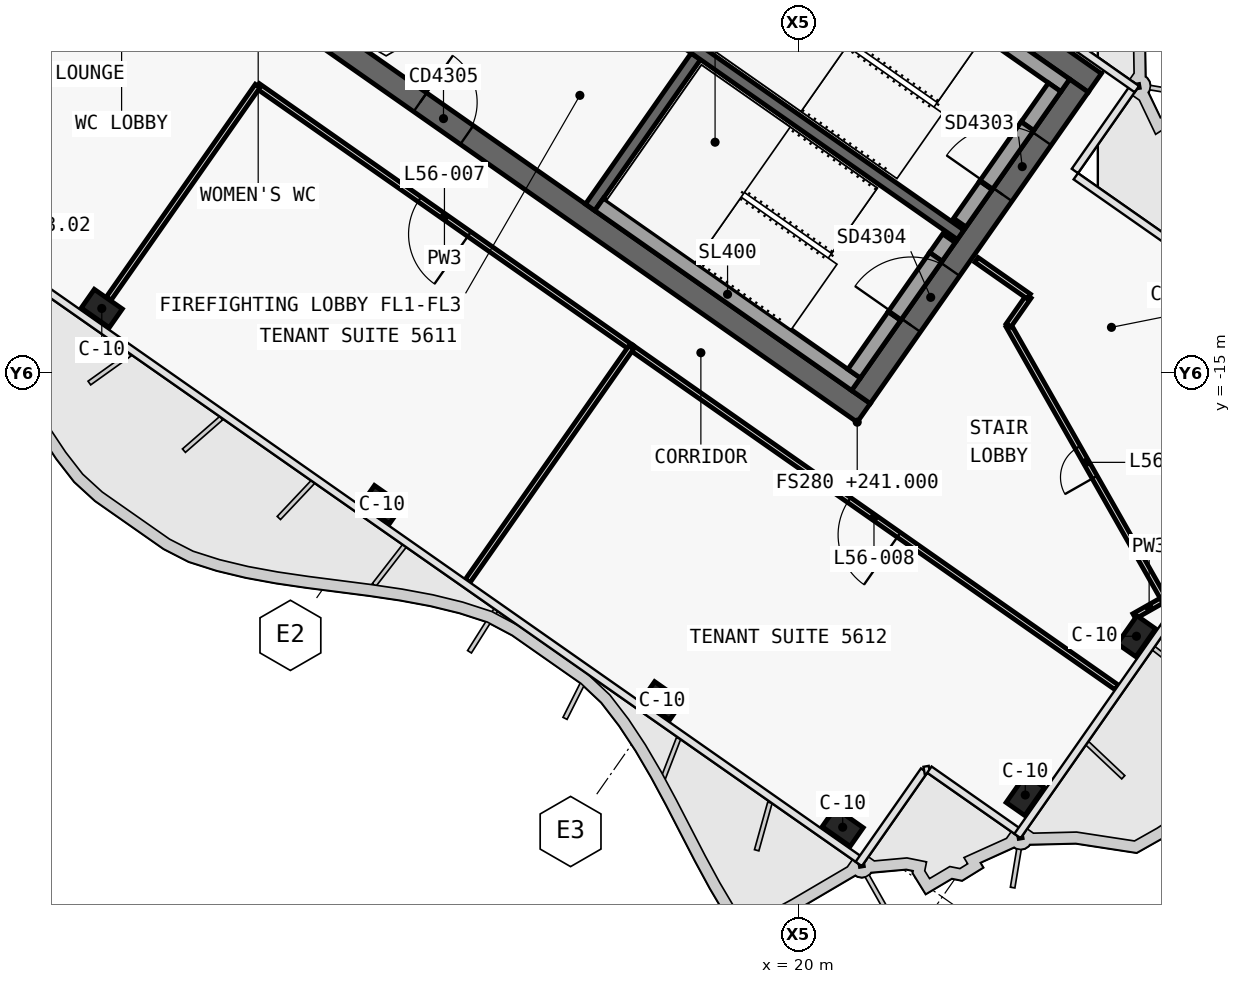
"""IFC4 building model, lengths in metres.
Left out: names, types, materials, properties, quantities, classifications, styles, units other than length and angle.
Written with IfcOpenShell. Run it as: python <this file> out.ifc"""

import sys

from ifc_helpers import new_model, si_unit, direction, frame, frame_2d, origin, origin_2d, place, context, subcontext, project, spatial, polyline, rectangle, outline, extrude, element, fill, save


model = new_model("IFC4")
c1 = context("Model", 3, precision=1e-05, world=origin(), true_north=direction((0.0, 1.0)))
c2 = subcontext(c1, "Body", "Model", "MODEL_VIEW")
j1 = project(units=[si_unit("LENGTHUNIT", "METRE"), si_unit("PLANEANGLEUNIT", "RADIAN")], contexts=[c1])
p1 = place(None, origin())
s1 = spatial("IfcSite", under=j1, at=p1, CompositionType="ELEMENT")
p2 = place(p1, origin())
s2 = spatial("IfcBuilding", under=s1, at=p2, CompositionType="ELEMENT")
p3 = place(p2, frame((0.0, 0.0, 241.0)))
s3 = spatial("IfcBuildingStorey", under=s2, at=p3, CompositionType="ELEMENT", Elevation=241.0)
p4 = place(p3, frame((0.028, 12.066, 0.0), z_axis=(0.0, 0.0, 1.0), x_axis=(0.819151382952, -0.573577380837, 0.0)))
e1 = element("IfcWall", 1, at=p4, inside=s3, PredefinedType="SHEAR", context=c2, shape_type="SweptSolid", body=[
    extrude(outline(polyline([(33.898, 0.3), (0.0, 0.3), (0.42, -0.3), (33.898, -0.3), (33.898, 0.3)])), origin(), (0.0, 0.0, 1.0), 3.9),
])
p5 = place(p3, frame((0.028, -0.874, 0.0), z_axis=(0.0, 0.0, 1.0), x_axis=(0.819150035022, -0.573579305871, 0.0)))
e2 = element("IfcWall", 2, at=p5, inside=s3, PredefinedType="SHEAR", context=c2, shape_type="SweptSolid", body=[
    extrude(outline(polyline([(26.476, 0.3), (0.0, 0.3), (0.42, -0.3), (26.476, -0.3), (26.476, 0.3)])), origin(), (0.0, 0.0, 1.0), 3.9),
])
p6 = place(p5, frame((0.826, 0.0, 0.0)))
e3 = element("IfcOpeningElement", 3, at=p6, cuts=e2, PredefinedType="OPENING", context=c2, shape_type="SweptSolid", body=[
    extrude(rectangle(XDim=1.5, YDim=2.1, at=frame_2d((0.75, 1.05))), frame((0.0, 0.31, 0.0), z_axis=(0.0, -1.0, 0.0), x_axis=(1.0, 0.0, 0.0)), (0.0, 0.0, 1.0), 0.62),
])
p7 = place(p5, frame((12.226, 0.0, 0.0)))
e4 = element("IfcOpeningElement", 4, at=p7, cuts=e2, PredefinedType="OPENING", context=c2, shape_type="SweptSolid", body=[
    extrude(rectangle(XDim=1.5, YDim=2.1, at=frame_2d((0.75, 1.05))), frame((0.0, 0.31, 0.0), z_axis=(0.0, -1.0, 0.0), x_axis=(1.0, 0.0, 0.0)), (0.0, 0.0, 1.0), 0.62),
])
p8 = place(p3, frame((21.642, -15.642, 0.0), z_axis=(0.0, 0.0, 1.0), x_axis=(0.573586866468, 0.819144740944, 0.0)))
e5 = element("IfcWall", 5, at=p8, inside=s3, PredefinedType="SHEAR", context=c2, shape_type="SweptSolid", body=[
    extrude(outline(polyline([(10.0, 0.3), (0.0, 0.3), (0.0, -0.3), (10.0, -0.3), (10.0, 0.3)])), origin(), (0.0, 0.0, 1.0), 3.9),
])
p9 = place(p8, frame((6.5, 0.0, 0.0)))
e6 = element("IfcOpeningElement", 6, at=p9, cuts=e5, PredefinedType="OPENING", context=c2, shape_type="SweptSolid", body=[
    extrude(rectangle(XDim=1.8, YDim=2.1, at=frame_2d((0.9, 1.05))), frame((0.0, 0.31, 0.0), z_axis=(0.0, -1.0, 0.0), x_axis=(1.0, 0.0, 0.0)), (0.0, 0.0, 1.0), 0.62),
])
p10 = place(p8, frame((2.3, 0.0, 0.0)))
e7 = element("IfcOpeningElement", 7, at=p10, cuts=e5, PredefinedType="OPENING", context=c2, shape_type="SweptSolid", body=[
    extrude(rectangle(XDim=1.8, YDim=2.1, at=frame_2d((0.9, 1.05))), frame((0.0, 0.31, 0.0), z_axis=(0.0, -1.0, 0.0), x_axis=(1.0, 0.0, 0.0)), (0.0, 0.0, 1.0), 0.62),
])
p11 = place(p3, frame((14.515, -10.652, 0.0), z_axis=(0.0, 0.0, 1.0), x_axis=(0.573560315113, 0.819163332265, 0.0)))
e8 = element("IfcWall", 8, at=p11, inside=s3, PredefinedType="SHEAR", context=c2, shape_type="SweptSolid", body=[
    extrude(outline(polyline([(0.0, 0.15), (0.0, -0.15), (4.85, -0.15), (4.85, 0.15), (0.0, 0.15)])), origin(), (0.0, 0.0, 1.0), 3.9),
])
p12 = place(p3, frame((2.638, 3.768, 0.0), z_axis=(0.0, 0.0, 1.0), x_axis=(0.819155014212, -0.573572194837, 0.0)))
e9 = element("IfcWall", 9, at=p12, inside=s3, PredefinedType="SHEAR", context=c2, shape_type="SweptSolid", body=[
    extrude(outline(polyline([(0.0, 0.15), (0.0, -0.15), (26.4, -0.15), (26.4, 0.15), (0.0, 0.15)])), origin(), (0.0, 0.0, 1.0), 3.9),
])
p13 = place(p12, frame((9.637, 0.0, 0.0)))
e10 = element("IfcOpeningElement", 10, at=p13, cuts=e9, PredefinedType="OPENING", context=c2, shape_type="SweptSolid", body=[
    extrude(rectangle(XDim=1.2, YDim=2.1, at=frame_2d((0.6, 1.05))), frame((0.0, 0.16, 0.0), z_axis=(0.0, -1.0, 0.0), x_axis=(1.0, 0.0, 0.0)), (0.0, 0.0, 1.0), 0.32),
])
p14 = place(p12, frame((11.812, 0.0, 0.0)))
e11 = element("IfcOpeningElement", 11, at=p14, cuts=e9, PredefinedType="OPENING", context=c2, shape_type="SweptSolid", body=[
    extrude(rectangle(XDim=1.2, YDim=2.1, at=frame_2d((0.6, 1.05))), frame((0.0, 0.16, 0.0), z_axis=(0.0, -1.0, 0.0), x_axis=(1.0, 0.0, 0.0)), (0.0, 0.0, 1.0), 0.32),
])
p15 = place(p12, frame((13.988, 0.0, 0.0)))
e12 = element("IfcOpeningElement", 12, at=p15, cuts=e9, PredefinedType="OPENING", context=c2, shape_type="SweptSolid", body=[
    extrude(rectangle(XDim=1.2, YDim=2.1, at=frame_2d((0.6, 1.05))), frame((0.0, 0.16, 0.0), z_axis=(0.0, -1.0, 0.0), x_axis=(1.0, 0.0, 0.0)), (0.0, 0.0, 1.0), 0.32),
])
p16 = place(p12, frame((16.262, 0.0, 0.0)))
e13 = element("IfcOpeningElement", 13, at=p16, cuts=e9, PredefinedType="OPENING", context=c2, shape_type="SweptSolid", body=[
    extrude(rectangle(XDim=1.0, YDim=2.1, at=frame_2d((0.5, 1.05))), frame((0.0, 0.16, 0.0), z_axis=(0.0, -1.0, 0.0), x_axis=(1.0, 0.0, 0.0)), (0.0, 0.0, 1.0), 0.32),
])
for number, where, z_axis, x_axis in (
    (14, (1.665, -13.313, 0.0), (0.0, 0.0, 1.0), (0.819, -0.574, 0.0)),
    (15, (9.038, -18.475, 0.0), (0.0, 0.0, 1.0), (0.819, -0.574, 0.0)),
    (16, (16.41, -23.637, 0.0), (0.0, 0.0, 1.0), (0.819, -0.574, 0.0)),
    (17, (21.161, -26.964, 0.0), (0.0, 0.0, 1.0), (0.819, -0.574, 0.0)),
    (18, (25.966, -26.117, 0.0), (0.0, 0.0, 1.0), (0.574, 0.819, 0.0)),
    (19, (28.891, -21.939, 0.0), (0.0, 0.0, 1.0), (0.574, 0.819, 0.0)),
):
    element("IfcColumn", number, at=place(p3, frame(where, z_axis=z_axis, x_axis=x_axis)), inside=s3, PredefinedType="COLUMN", context=c2, shape_type="SweptSolid", body=[
        extrude(rectangle(XDim=0.9, YDim=0.6, at=origin_2d()), origin(), (0.0, 0.0, 1.0), 3.9),
    ])
p17 = place(p3, frame((20.259, -2.71, 0.0), z_axis=(0.0, 0.0, 1.0), x_axis=(0.81914849389, -0.573581506813, 0.0)))
e20 = element("IfcWall", 20, at=p17, inside=s3, PredefinedType="SOLIDWALL", context=c2, shape_type="SweptSolid", body=[
    extrude(rectangle(XDim=8.25, YDim=0.4, at=frame_2d((4.125, 0.0))), origin(), (0.0, 0.0, 1.0), 3.62),
])
p18 = place(p3, frame((24.244, -11.055, 0.0), z_axis=(0.0, 0.0, 1.0), x_axis=(0.573571582932, 0.819155442668, 0.0)))
e21 = element("IfcWall", 21, at=p18, inside=s3, PredefinedType="SOLIDWALL", context=c2, shape_type="SweptSolid", body=[
    extrude(rectangle(XDim=1.2, YDim=0.4, at=frame_2d((0.6, 0.0))), origin(), (0.0, 0.0, 1.0), 3.62),
])
p19 = place(p3, frame((26.022, -8.515, 0.0), z_axis=(0.0, 0.0, 1.0), x_axis=(0.573619628835, 0.819121798889, 0.0)))
e22 = element("IfcWall", 22, at=p19, inside=s3, PredefinedType="SOLIDWALL", context=c2, shape_type="SweptSolid", body=[
    extrude(rectangle(XDim=1.25, YDim=0.4, at=frame_2d((0.625, 0.0))), origin(), (0.0, 0.0, 1.0), 3.62),
])
p20 = place(p3, frame((24.932, -10.072, 2.15), z_axis=(0.0, 0.0, 1.0), x_axis=(0.573591692345, 0.819141361715, 0.0)))
e23 = element("IfcWall", 23, at=p20, inside=s3, PredefinedType="SOLIDWALL", context=c2, shape_type="SweptSolid", body=[
    extrude(rectangle(XDim=1.9, YDim=0.4, at=frame_2d((0.95, 0.0))), origin(), (0.0, 0.0, 1.0), 1.47),
])
p21 = place(p3, frame((14.753, -10.574, 0.0), z_axis=(0.0, 0.0, 1.0), x_axis=(0.819158229677, -0.573567602601, 0.0)))
e24 = element("IfcWall", 24, at=p21, inside=s3, PredefinedType="SOLIDWALL", context=c2, shape_type="SweptSolid", body=[
    extrude(rectangle(XDim=8.25, YDim=0.4, at=frame_2d((4.125, 0.0))), origin(), (0.0, 0.0, 1.0), 3.62),
])
p22 = place(p3, frame((21.462, -15.028, 0.0), z_axis=(0.0, 0.0, 1.0), x_axis=(0.573559770908, 0.819163713305, 0.0)))
e25 = element("IfcWall", 25, at=p22, inside=s3, PredefinedType="SOLIDWALL", context=c2, shape_type="SweptSolid", body=[
    extrude(rectangle(XDim=1.85, YDim=0.4, at=frame_2d((0.925, 0.0))), origin(), (0.0, 0.0, 1.0), 3.62),
])
p23 = place(p3, frame((23.613, -11.956, 0.0), z_axis=(0.0, 0.0, 1.0), x_axis=(0.573435029941, 0.819251039936, 0.0)))
e26 = element("IfcWall", 26, at=p23, inside=s3, PredefinedType="SOLIDWALL", context=c2, shape_type="SweptSolid", body=[
    extrude(rectangle(XDim=0.6, YDim=0.4, at=frame_2d((0.3, 0.0))), origin(), (0.0, 0.0, 1.0), 3.62),
])
p24 = place(p3, frame((22.523, -13.512, 2.15), z_axis=(0.0, 0.0, 1.0), x_axis=(0.573591692345, 0.819141361715, 0.0)))
e27 = element("IfcWall", 27, at=p24, inside=s3, PredefinedType="SOLIDWALL", context=c2, shape_type="SweptSolid", body=[
    extrude(rectangle(XDim=1.9, YDim=0.4, at=frame_2d((0.95, 0.0))), origin(), (0.0, 0.0, 1.0), 1.47),
])
p25 = place(p3, frame((15.598, -14.34, 0.0), z_axis=(0.0, 0.0, 1.0), x_axis=(-0.81915546166, 0.573571555809, 0.0)))
e28 = element("IfcWall", 28, at=p25, inside=s3, PredefinedType="PARTITIONING", context=c2, shape_type="SweptSolid", body=[
    extrude(rectangle(XDim=12.002, YDim=0.15, at=frame_2d((6.001, 0.0))), origin(), (0.0, 0.0, 1.0), 3.05),
])
p26 = place(p25, frame((5.201, 0.0, 0.0)))
e29 = element("IfcOpeningElement", 29, at=p26, cuts=e28, PredefinedType="OPENING", context=c2, shape_type="SweptSolid", body=[
    extrude(rectangle(XDim=1.6, YDim=2.1, at=frame_2d((0.8, 1.05))), frame((0.0, 0.085, 0.0), z_axis=(0.0, -1.0, 0.0), x_axis=(1.0, 0.0, 0.0)), (0.0, 0.0, 1.0), 0.17),
])
p27 = place(p3, frame((28.375, -23.287, 0.0), z_axis=(0.0, 0.0, 1.0), x_axis=(-0.819153253106, 0.573574709977, 0.0)))
e30 = element("IfcWall", 30, at=p27, inside=s3, PredefinedType="PARTITIONING", context=c2, shape_type="SweptSolid", body=[
    extrude(rectangle(XDim=15.602, YDim=0.15, at=frame_2d((7.801, 0.0))), origin(), (0.0, 0.0, 1.0), 3.0),
])
p28 = place(p27, frame((7.001, 0.0, 0.0)))
e31 = element("IfcOpeningElement", 31, at=p28, cuts=e30, PredefinedType="OPENING", context=c2, shape_type="SweptSolid", body=[
    extrude(rectangle(XDim=1.6, YDim=2.1, at=frame_2d((0.8, 1.05))), frame((0.0, 0.085, 0.0), z_axis=(0.0, -1.0, 0.0), x_axis=(1.0, 0.0, 0.0)), (0.0, 0.0, 1.0), 0.17),
])
p29 = place(p3, frame((28.834, -21.411, 0.0), z_axis=(0.0, 0.0, 1.0), x_axis=(0.869525386045, 0.493888249529, 0.0)))
e32 = element("IfcWall", 32, at=p29, inside=s3, PredefinedType="PARTITIONING", context=c2, shape_type="SweptSolid", body=[
    extrude(rectangle(XDim=0.9, YDim=0.15, at=frame_2d((0.45, 0.0))), origin(), (0.0, 0.0, 1.0), 3.0),
])
p30 = place(p3, frame((29.617, -20.966, 0.0), z_axis=(0.0, 0.0, 1.0), x_axis=(-0.493827705015, 0.86955977239, 0.0)))
e33 = element("IfcWall", 33, at=p30, inside=s3, PredefinedType="PARTITIONING", context=c2, shape_type="SweptSolid", body=[
    extrude(rectangle(XDim=8.288, YDim=0.15, at=frame_2d((4.144, 0.0))), origin(), (0.0, 0.0, 1.0), 3.0),
])
p31 = place(p30, frame((3.694, 0.0, 0.0)))
e34 = element("IfcOpeningElement", 34, at=p31, cuts=e33, PredefinedType="OPENING", context=c2, shape_type="SweptSolid", body=[
    extrude(rectangle(XDim=0.9, YDim=2.1, at=frame_2d((0.45, 1.05))), frame((0.0, 0.085, 0.0), z_axis=(0.0, -1.0, 0.0), x_axis=(1.0, 0.0, 0.0)), (0.0, 0.0, 1.0), 0.17),
])
p32 = place(p3, frame((25.524, -13.759, 0.0), z_axis=(0.0, 0.0, 1.0), x_axis=(0.573497542524, 0.81920728068, 0.0)))
e35 = element("IfcWall", 35, at=p32, inside=s3, PredefinedType="PARTITIONING", context=c2, shape_type="SweptSolid", body=[
    extrude(rectangle(XDim=0.931, YDim=0.15, at=frame_2d((0.465, 0.0))), origin(), (0.0, 0.0, 1.0), 3.62),
])
p33 = place(p3, frame((26.058, -12.997, 0.0), z_axis=(0.0, 0.0, 1.0), x_axis=(-0.819109000826, 0.573637903879, 0.0)))
e36 = element("IfcWall", 36, at=p33, inside=s3, PredefinedType="PARTITIONING", context=c2, shape_type="SweptSolid", body=[
    extrude(rectangle(XDim=1.68, YDim=0.15, at=frame_2d((0.84, 0.0))), origin(), (0.0, 0.0, 1.0), 3.62),
])
p34 = place(p3, frame((15.596, -14.339, 0.0), z_axis=(0.0, 0.0, 1.0), x_axis=(-0.573560650686, -0.819163097304, 0.0)))
e37 = element("IfcWall", 37, at=p34, inside=s3, PredefinedType="PARTITIONING", context=c2, shape_type="SweptSolid", body=[
    extrude(rectangle(XDim=7.5, YDim=0.15, at=frame_2d((3.75, 0.0))), origin(), (0.0, 0.0, 1.0), 3.0),
])
p35 = place(p3, frame((1.849, -13.051, 0.0), z_axis=(0.0, 0.0, 1.0), x_axis=(0.573577493031, 0.819151304393, 0.0)))
e38 = element("IfcWall", 38, at=p35, inside=s3, PredefinedType="PARTITIONING", context=c2, shape_type="SweptSolid", body=[
    extrude(rectangle(XDim=6.83, YDim=0.15, at=frame_2d((3.415, 0.0))), origin(), (0.0, 0.0, 1.0), 3.05),
])
p36 = place(p7, origin())
e39 = element("IfcDoor", 39, at=p36, inside=s3, OperationType="DOUBLE_DOOR_SINGLE_SWING", PredefinedType="DOOR", context=c2, shape_type="SweptSolid", body=[
    extrude(rectangle(XDim=1.5, YDim=2.1, at=frame_2d((0.75, 1.05))), frame((0.0, 0.025, 0.0), z_axis=(0.0, -1.0, 0.0), x_axis=(1.0, 0.0, 0.0)), (0.0, 0.0, 1.0), 0.05),
])
fill(e4, e39)
p37 = place(p9, origin())
e40 = element("IfcDoor", 40, at=p37, inside=s3, OperationType="DOUBLE_DOOR_SINGLE_SWING", PredefinedType="DOOR", context=c2, shape_type="SweptSolid", body=[
    extrude(rectangle(XDim=1.8, YDim=2.1, at=frame_2d((0.9, 1.05))), frame((0.0, 0.025, 0.0), z_axis=(0.0, -1.0, 0.0), x_axis=(1.0, 0.0, 0.0)), (0.0, 0.0, 1.0), 0.05),
])
fill(e6, e40)
p38 = place(p10, origin())
e41 = element("IfcDoor", 41, at=p38, inside=s3, OperationType="DOUBLE_DOOR_SINGLE_SWING", PredefinedType="DOOR", context=c2, shape_type="SweptSolid", body=[
    extrude(rectangle(XDim=1.8, YDim=2.1, at=frame_2d((0.9, 1.05))), frame((0.0, 0.025, 0.0), z_axis=(0.0, -1.0, 0.0), x_axis=(1.0, 0.0, 0.0)), (0.0, 0.0, 1.0), 0.05),
])
fill(e7, e41)
p39 = place(p26, origin())
e42 = element("IfcDoor", 42, at=p39, inside=s3, OperationType="DOUBLE_DOOR_SINGLE_SWING", PredefinedType="DOOR", context=c2, shape_type="SweptSolid", body=[
    extrude(rectangle(XDim=1.6, YDim=2.1, at=frame_2d((0.8, 1.05))), frame((0.0, 0.025, 0.0), z_axis=(0.0, -1.0, 0.0), x_axis=(1.0, 0.0, 0.0)), (0.0, 0.0, 1.0), 0.05),
])
fill(e29, e42)
p40 = place(p28, origin())
e43 = element("IfcDoor", 43, at=p40, inside=s3, OperationType="DOUBLE_DOOR_SINGLE_SWING", PredefinedType="DOOR", context=c2, shape_type="SweptSolid", body=[
    extrude(rectangle(XDim=1.6, YDim=2.1, at=frame_2d((0.8, 1.05))), frame((0.0, 0.025, 0.0), z_axis=(0.0, -1.0, 0.0), x_axis=(1.0, 0.0, 0.0)), (0.0, 0.0, 1.0), 0.05),
])
fill(e31, e43)
p41 = place(p31, origin())
e44 = element("IfcDoor", 44, at=p41, inside=s3, OperationType="SINGLE_SWING_RIGHT", PredefinedType="DOOR", context=c2, shape_type="SweptSolid", body=[
    extrude(rectangle(XDim=0.9, YDim=2.1, at=frame_2d((0.45, 1.05))), frame((0.0, 0.025, 0.0), z_axis=(0.0, -1.0, 0.0), x_axis=(1.0, 0.0, 0.0)), (0.0, 0.0, 1.0), 0.05),
])
fill(e34, e44)
save(model, sys.argv[1])
